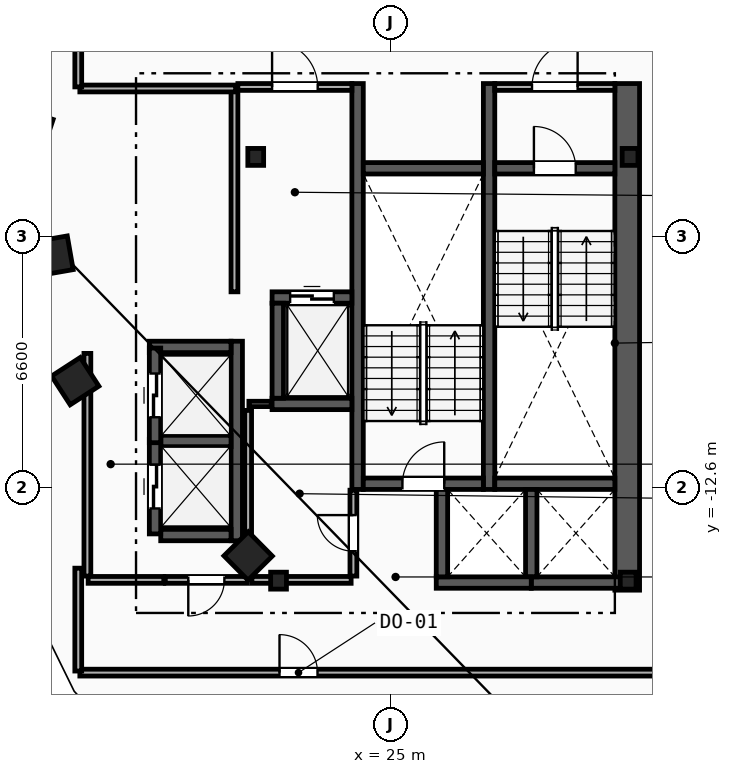
"""IFC4 building model, lengths in metres.
Left out: names, types, materials, properties, quantities, classifications, styles, units other than length and angle.
Written with IfcOpenShell. Run it as: python <this file> out.ifc"""

import sys

from ifc_helpers import new_model, si_unit, direction, frame, frame_2d, origin, origin_2d, place, context, subcontext, project, spatial, rectangle, i_section, extrude, element, fill, save


model = new_model("IFC4")
c1 = context("Model", 3, precision=1e-05, world=origin(), true_north=direction((0.0, 1.0)))
c2 = subcontext(c1, "Body", "Model", "MODEL_VIEW")
j1 = project(units=[si_unit("LENGTHUNIT", "METRE"), si_unit("PLANEANGLEUNIT", "RADIAN")], contexts=[c1])
p1 = place(None, origin())
s1 = spatial("IfcSite", under=j1, at=p1, CompositionType="ELEMENT")
p2 = place(p1, origin())
s2 = spatial("IfcBuilding", under=s1, at=p2, CompositionType="ELEMENT")
p3 = place(p2, frame((0.0, 0.0, 199.0)))
s3 = spatial("IfcBuildingStorey", under=s2, at=p3, CompositionType="ELEMENT", Elevation=199.0)
for number, where, z_axis, x_axis in (
    (1, (31.3, -3.9, 0.0), (0.0, 0.0, 1.0), (1.0, 0.0, 0.0)),
    (2, (21.45, -3.9, 0.0), (0.0, 0.0, 1.0), (1.0, 0.0, 0.0)),
    (3, (22.05, -15.05, 0.0), (0.0, 0.0, 1.0), (1.0, 0.0, 0.0)),
    (4, (31.25, -15.05, 0.0), (0.0, 0.0, 1.0), (1.0, 0.0, 0.0)),
):
    element("IfcColumn", number, at=place(p3, frame(where, z_axis=z_axis, x_axis=x_axis)), inside=s3, PredefinedType="COLUMN", context=c2, shape_type="SweptSolid", body=[
        extrude(i_section(OverallWidth=0.416, OverallDepth=0.446, WebThickness=0.039, FlangeThickness=0.063, FilletRadius=0.018, at=origin_2d()), origin(), (0.0, 0.0, 1.0), 3.6),
    ])
for number, where, z_axis, x_axis in (
    (5, (15.55, -3.2, 0.0), (0.0, 0.0, 1.0), (-0.315, -0.949, 0.0)),
    (6, (16.125, -6.5, 0.0), (0.0, 0.0, 1.0), (0.172, -0.985, 0.0)),
    (7, (16.7, -9.8, 0.0), (0.0, 0.0, 1.0), (0.544, -0.839, 0.0)),
    (8, (21.25, -14.4, 0.0), (0.0, 0.0, 1.0), (0.703, -0.711, 0.0)),
):
    element("IfcColumn", number, at=place(p3, frame(where, z_axis=z_axis, x_axis=x_axis)), inside=s3, PredefinedType="COLUMN", context=c2, shape_type="SweptSolid", body=[
        extrude(rectangle(XDim=0.9, YDim=0.9, at=origin_2d()), origin(), (0.0, 0.0, 1.0), 3.6),
    ])
p4 = place(p3, frame((31.225, -15.3, 0.0), z_axis=(0.0, 0.0, 1.0), x_axis=(0.0, 1.0, 0.0)))
e9 = element("IfcWall", 9, at=p4, inside=s3, PredefinedType="SHEAR", context=c2, shape_type="SweptSolid", body=[
    extrude(rectangle(XDim=13.33, YDim=0.65, at=frame_2d((6.665, 0.0))), origin(), (0.0, 0.0, 1.0), 3.34),
])
for number, where, z_axis, x_axis in (
    (10, (27.59, -12.65, 0.0), (0.0, 0.0, 1.0), (0.0, 1.0, 0.0)),
    (11, (24.13, -12.65, 0.0), (0.0, 0.0, 1.0), (0.0, 1.0, 0.0)),
):
    element("IfcWall", number, at=place(p3, frame(where, z_axis=z_axis, x_axis=x_axis)), inside=s3, PredefinedType="SHEAR", context=c2, shape_type="SweptSolid", body=[
        extrude(rectangle(XDim=10.68, YDim=0.3, at=frame_2d((5.34, 0.0))), origin(), (0.0, 0.0, 1.0), 3.34),
    ])
p5 = place(p3, frame((27.74, -4.2, 0.0), z_axis=(0.0, 0.0, 1.0), x_axis=(1.0, 0.0, 0.0)))
e12 = element("IfcWall", 12, at=p5, inside=s3, PredefinedType="SHEAR", context=c2, shape_type="SweptSolid", body=[
    extrude(rectangle(XDim=3.16, YDim=0.3, at=frame_2d((1.58, 0.0))), origin(), (0.0, 0.0, 1.0), 3.34),
])
p6 = place(p5, frame((1.03, 0.0, 0.0)))
e13 = element("IfcOpeningElement", 13, at=p6, cuts=e12, PredefinedType="OPENING", context=c2, shape_type="SweptSolid", body=[
    extrude(rectangle(XDim=1.1, YDim=2.15, at=frame_2d((0.55, 1.075))), frame((0.0, 0.16, 0.0), z_axis=(0.0, -1.0, 0.0), x_axis=(1.0, 0.0, 0.0)), (0.0, 0.0, 1.0), 0.32),
])
p7 = place(p3, frame((27.74, -12.5, 0.0), z_axis=(0.0, 0.0, 1.0), x_axis=(1.0, 0.0, 0.0)))
e14 = element("IfcWall", 14, at=p7, inside=s3, PredefinedType="SHEAR", context=c2, shape_type="SweptSolid", body=[
    extrude(rectangle(XDim=3.16, YDim=0.3, at=frame_2d((1.58, 0.0))), origin(), (0.0, 0.0, 1.0), 3.34),
])
p8 = place(p3, frame((24.28, -12.5, 0.0), z_axis=(0.0, 0.0, 1.0), x_axis=(1.0, 0.0, 0.0)))
e15 = element("IfcWall", 15, at=p8, inside=s3, PredefinedType="SHEAR", context=c2, shape_type="SweptSolid", body=[
    extrude(rectangle(XDim=3.16, YDim=0.3, at=frame_2d((1.58, 0.0))), origin(), (0.0, 0.0, 1.0), 3.34),
])
p9 = place(p8, frame((1.03, 0.0, 0.0)))
e16 = element("IfcOpeningElement", 16, at=p9, cuts=e15, PredefinedType="OPENING", context=c2, shape_type="SweptSolid", body=[
    extrude(rectangle(XDim=1.1, YDim=2.15, at=frame_2d((0.55, 1.075))), frame((0.0, 0.16, 0.0), z_axis=(0.0, -1.0, 0.0), x_axis=(1.0, 0.0, 0.0)), (0.0, 0.0, 1.0), 0.32),
])
p10 = place(p3, frame((24.28, -4.2, 0.0), z_axis=(0.0, 0.0, 1.0), x_axis=(1.0, 0.0, 0.0)))
e17 = element("IfcWall", 17, at=p10, inside=s3, PredefinedType="SHEAR", context=c2, shape_type="SweptSolid", body=[
    extrude(rectangle(XDim=3.16, YDim=0.3, at=frame_2d((1.58, 0.0))), origin(), (0.0, 0.0, 1.0), 3.34),
])
p11 = place(p3, frame((20.89, -7.45, 0.0), z_axis=(0.0, 0.0, 1.0), x_axis=(0.0, 1.0, 0.0)))
e18 = element("IfcWall", 18, at=p11, inside=s3, PredefinedType="PARTITIONING", context=c2, shape_type="SweptSolid", body=[
    extrude(rectangle(XDim=5.3, YDim=0.18, at=frame_2d((2.65, 0.0))), origin(), (0.0, 0.0, 1.0), 3.34),
])
p12 = place(p3, frame((20.98, -2.06, 0.0), z_axis=(0.0, 0.0, 1.0), x_axis=(1.0, 0.0, 0.0)))
e19 = element("IfcWall", 19, at=p12, inside=s3, PredefinedType="PARTITIONING", context=c2, shape_type="SweptSolid", body=[
    extrude(rectangle(XDim=3.0, YDim=0.18, at=frame_2d((1.5, 0.0))), origin(), (0.0, 0.0, 1.0), 3.34),
])
p13 = place(p12, frame((0.9, 0.0, 0.0)))
e20 = element("IfcOpeningElement", 20, at=p13, cuts=e19, PredefinedType="OPENING", context=c2, shape_type="SweptSolid", body=[
    extrude(rectangle(XDim=1.2, YDim=2.15, at=frame_2d((0.6, 1.075))), frame((0.0, 0.1, 0.0), z_axis=(0.0, -1.0, 0.0), x_axis=(1.0, 0.0, 0.0)), (0.0, 0.0, 1.0), 0.2),
])
p14 = place(p3, frame((27.74, -2.06, 0.0), z_axis=(0.0, 0.0, 1.0), x_axis=(1.0, 0.0, 0.0)))
e21 = element("IfcWall", 21, at=p14, inside=s3, PredefinedType="PARTITIONING", context=c2, shape_type="SweptSolid", body=[
    extrude(rectangle(XDim=3.16, YDim=0.18, at=frame_2d((1.58, 0.0))), origin(), (0.0, 0.0, 1.0), 3.34),
])
p15 = place(p14, frame((0.98, 0.0, 0.0)))
e22 = element("IfcOpeningElement", 22, at=p15, cuts=e21, PredefinedType="OPENING", context=c2, shape_type="SweptSolid", body=[
    extrude(rectangle(XDim=1.2, YDim=2.15, at=frame_2d((0.6, 1.075))), frame((0.0, 0.1, 0.0), z_axis=(0.0, -1.0, 0.0), x_axis=(1.0, 0.0, 0.0)), (0.0, 0.0, 1.0), 0.2),
])
p16 = place(p3, frame((21.88, -7.6, 0.0), z_axis=(0.0, 0.0, 1.0), x_axis=(1.0, 0.0, 0.0)))
e23 = element("IfcWall", 23, at=p16, inside=s3, PredefinedType="SHEAR", context=c2, shape_type="SweptSolid", body=[
    extrude(rectangle(XDim=2.1, YDim=0.3, at=frame_2d((1.05, 0.0))), origin(), (0.0, 0.0, 1.0), 3.34),
])
p17 = place(p16, frame((0.475, 0.0, 0.0)))
e24 = element("IfcOpeningElement", 24, at=p17, cuts=e23, PredefinedType="OPENING", context=c2, shape_type="SweptSolid", body=[
    extrude(rectangle(XDim=1.15, YDim=2.2, at=frame_2d((0.575, 1.1))), frame((0.0, 0.16, 0.0), z_axis=(0.0, -1.0, 0.0), x_axis=(1.0, 0.0, 0.0)), (0.0, 0.0, 1.0), 0.32),
])
p18 = place(p3, frame((21.88, -10.4, 0.0), z_axis=(0.0, 0.0, 1.0), x_axis=(1.0, 0.0, 0.0)))
e25 = element("IfcWall", 25, at=p18, inside=s3, PredefinedType="SHEAR", context=c2, shape_type="SweptSolid", body=[
    extrude(rectangle(XDim=2.1, YDim=0.3, at=frame_2d((1.05, 0.0))), origin(), (0.0, 0.0, 1.0), 3.34),
])
for number, where, z_axis, x_axis in (
    (26, (22.03, -10.25, 0.0), (0.0, 0.0, 1.0), (0.0, 1.0, 0.0)),
    (27, (28.7, -15.1, 0.0), (0.0, 0.0, 1.0), (1.0, 0.0, 0.0)),
):
    element("IfcWall", number, at=place(p3, frame(where, z_axis=z_axis, x_axis=x_axis)), inside=s3, PredefinedType="SHEAR", context=c2, shape_type="SweptSolid", body=[
        extrude(rectangle(XDim=2.5, YDim=0.3, at=frame_2d((1.25, 0.0))), origin(), (0.0, 0.0, 1.0), 3.34),
    ])
p19 = place(p3, frame((28.7, -14.95, 0.0), z_axis=(0.0, 0.0, 1.0), x_axis=(0.0, 1.0, 0.0)))
e28 = element("IfcWall", 28, at=p19, inside=s3, PredefinedType="SHEAR", context=c2, shape_type="SweptSolid", body=[
    extrude(rectangle(XDim=2.3, YDim=0.3, at=frame_2d((1.15, 0.0))), origin(), (0.0, 0.0, 1.0), 3.34),
])
p20 = place(p3, frame((26.2, -15.1, 0.0), z_axis=(0.0, 0.0, 1.0), x_axis=(1.0, 0.0, 0.0)))
e29 = element("IfcWall", 29, at=p20, inside=s3, PredefinedType="SHEAR", context=c2, shape_type="SweptSolid", body=[
    extrude(rectangle(XDim=2.5, YDim=0.3, at=frame_2d((1.25, 0.0))), origin(), (0.0, 0.0, 1.0), 3.34),
])
p21 = place(p3, frame((26.35, -14.95, 0.0), z_axis=(0.0, 0.0, 1.0), x_axis=(0.0, 1.0, 0.0)))
e30 = element("IfcWall", 30, at=p21, inside=s3, PredefinedType="SHEAR", context=c2, shape_type="SweptSolid", body=[
    extrude(rectangle(XDim=2.3, YDim=0.3, at=frame_2d((1.15, 0.0))), origin(), (0.0, 0.0, 1.0), 3.34),
])
p22 = place(p3, frame((20.95, -14.0, 0.0), z_axis=(0.0, 0.0, 1.0), x_axis=(0.0, 1.0, 0.0)))
e31 = element("IfcWall", 31, at=p22, inside=s3, PredefinedType="SHEAR", context=c2, shape_type="SweptSolid", body=[
    extrude(rectangle(XDim=5.25, YDim=0.3, at=frame_2d((2.625, 0.0))), origin(), (0.0, 0.0, 1.0), 3.34),
])
p23 = place(p3, frame((18.95, -13.85, 0.0), z_axis=(0.0, 0.0, 1.0), x_axis=(1.0, 0.0, 0.0)))
e32 = element("IfcWall", 32, at=p23, inside=s3, PredefinedType="SHEAR", context=c2, shape_type="SweptSolid", body=[
    extrude(rectangle(XDim=1.85, YDim=0.3, at=frame_2d((0.925, 0.0))), origin(), (0.0, 0.0, 1.0), 3.34),
])
p24 = place(p3, frame((18.65, -8.9, 0.0), z_axis=(0.0, 0.0, 1.0), x_axis=(1.0, 0.0, 0.0)))
e33 = element("IfcWall", 33, at=p24, inside=s3, PredefinedType="SHEAR", context=c2, shape_type="SweptSolid", body=[
    extrude(rectangle(XDim=2.15, YDim=0.3, at=frame_2d((1.075, 0.0))), origin(), (0.0, 0.0, 1.0), 3.34),
])
p25 = place(p3, frame((18.95, -11.375, 0.0), z_axis=(0.0, 0.0, 1.0), x_axis=(1.0, 0.0, 0.0)))
e34 = element("IfcWall", 34, at=p25, inside=s3, PredefinedType="SHEAR", context=c2, shape_type="SweptSolid", body=[
    extrude(rectangle(XDim=1.85, YDim=0.3, at=frame_2d((0.925, 0.0))), origin(), (0.0, 0.0, 1.0), 3.34),
])
p26 = place(p3, frame((18.8, -13.82, 0.0), z_axis=(0.0, 0.0, 1.0), x_axis=(0.0, 1.0, 0.0)))
e35 = element("IfcWall", 35, at=p26, inside=s3, PredefinedType="SHEAR", context=c2, shape_type="SweptSolid", body=[
    extrude(rectangle(XDim=2.49, YDim=0.3, at=frame_2d((1.245, 0.0))), origin(), (0.0, 0.0, 1.0), 3.34),
])
p27 = place(p26, frame((0.67, 0.0, 0.0)))
e36 = element("IfcOpeningElement", 36, at=p27, cuts=e35, PredefinedType="OPENING", context=c2, shape_type="SweptSolid", body=[
    extrude(rectangle(XDim=1.15, YDim=2.2, at=frame_2d((0.575, 1.1))), frame((0.0, 0.16, 0.0), z_axis=(0.0, -1.0, 0.0), x_axis=(1.0, 0.0, 0.0)), (0.0, 0.0, 1.0), 0.32),
])
p28 = place(p3, frame((18.8, -11.42, 0.0), z_axis=(0.0, 0.0, 1.0), x_axis=(0.0, 1.0, 0.0)))
e37 = element("IfcWall", 37, at=p28, inside=s3, PredefinedType="SHEAR", context=c2, shape_type="SweptSolid", body=[
    extrude(rectangle(XDim=2.49, YDim=0.3, at=frame_2d((1.245, 0.0))), origin(), (0.0, 0.0, 1.0), 3.34),
])
p29 = place(p28, frame((0.67, 0.0, 0.0)))
e38 = element("IfcOpeningElement", 38, at=p29, cuts=e37, PredefinedType="OPENING", context=c2, shape_type="SweptSolid", body=[
    extrude(rectangle(XDim=1.15, YDim=2.2, at=frame_2d((0.575, 1.1))), frame((0.0, 0.16, 0.0), z_axis=(0.0, -1.0, 0.0), x_axis=(1.0, 0.0, 0.0)), (0.0, 0.0, 1.0), 0.32),
])
p30 = place(p3, frame((17.02, -14.93, 0.0), z_axis=(0.0, 0.0, 1.0), x_axis=(0.0, 1.0, 0.0)))
e39 = element("IfcWall", 39, at=p30, inside=s3, PredefinedType="PARTITIONING", context=c2, shape_type="SweptSolid", body=[
    extrude(rectangle(XDim=5.86, YDim=0.18, at=frame_2d((2.93, 0.0))), origin(), (0.0, 0.0, 1.0), 3.34),
])
p31 = place(p3, frame((17.04, -15.03, 0.0), z_axis=(0.0, 0.0, 1.0), x_axis=(1.0, 0.0, 0.0)))
e40 = element("IfcWall", 40, at=p31, inside=s3, PredefinedType="PARTITIONING", context=c2, shape_type="SweptSolid", body=[
    extrude(rectangle(XDim=1.99, YDim=0.18, at=frame_2d((0.995, 0.0))), origin(), (0.0, 0.0, 1.0), 3.34),
])
p32 = place(p3, frame((21.23, -15.03, 0.0), z_axis=(0.0, 0.0, 1.0), x_axis=(-1.0, 0.0, 0.0)))
e41 = element("IfcWall", 41, at=p32, inside=s3, PredefinedType="PARTITIONING", context=c2, shape_type="SweptSolid", body=[
    extrude(rectangle(XDim=2.16, YDim=0.18, at=frame_2d((1.08, 0.0))), origin(), (0.0, 0.0, 1.0), 3.34),
])
p33 = place(p32, frame((0.605, 0.0, 0.0)))
e42 = element("IfcOpeningElement", 42, at=p33, cuts=e41, PredefinedType="OPENING", context=c2, shape_type="SweptSolid", body=[
    extrude(rectangle(XDim=0.95, YDim=2.1, at=frame_2d((0.475, 1.05))), frame((0.0, 0.1, 0.0), z_axis=(0.0, -1.0, 0.0), x_axis=(1.0, 0.0, 0.0)), (0.0, 0.0, 1.0), 0.2),
])
p34 = place(p3, frame((21.27, -10.4, 0.0), z_axis=(0.0, 0.0, 1.0), x_axis=(1.0, 0.0, 0.0)))
e43 = element("IfcWall", 43, at=p34, inside=s3, PredefinedType="PARTITIONING", context=c2, shape_type="SweptSolid", body=[
    extrude(rectangle(XDim=0.59, YDim=0.14, at=frame_2d((0.295, 0.0))), origin(), (0.0, 0.0, 1.0), 3.34),
])
p35 = place(p3, frame((21.25, -14.93, 0.0), z_axis=(0.0, 0.0, 1.0), x_axis=(0.0, 1.0, 0.0)))
e44 = element("IfcWall", 44, at=p35, inside=s3, PredefinedType="PARTITIONING", context=c2, shape_type="SweptSolid", body=[
    extrude(rectangle(XDim=4.36, YDim=0.18, at=frame_2d((2.18, 0.0))), origin(), (0.0, 0.0, 1.0), 3.34),
])
p36 = place(p3, frame((21.35, -15.03, 0.0), z_axis=(0.0, 0.0, 1.0), x_axis=(1.0, 0.0, 0.0)))
e45 = element("IfcWall", 45, at=p36, inside=s3, PredefinedType="PARTITIONING", context=c2, shape_type="SweptSolid", body=[
    extrude(rectangle(XDim=2.61, YDim=0.18, at=frame_2d((1.305, 0.0))), origin(), (0.0, 0.0, 1.0), 2.413),
])
p37 = place(p3, frame((24.02, -14.93, 0.0), z_axis=(0.0, 0.0, 1.0), x_axis=(0.0, 1.0, 0.0)))
e46 = element("IfcWall", 46, at=p37, inside=s3, PredefinedType="PARTITIONING", context=c2, shape_type="SweptSolid", body=[
    extrude(rectangle(XDim=2.26, YDim=0.18, at=frame_2d((1.13, 0.0))), origin(), (0.0, 0.0, 1.0), 3.34),
])
p38 = place(p37, frame((0.655, 0.0, 0.0)))
e47 = element("IfcOpeningElement", 47, at=p38, cuts=e46, PredefinedType="OPENING", context=c2, shape_type="SweptSolid", body=[
    extrude(rectangle(XDim=0.95, YDim=2.1, at=frame_2d((0.475, 1.05))), frame((0.0, 0.1, 0.0), z_axis=(0.0, -1.0, 0.0), x_axis=(1.0, 0.0, 0.0)), (0.0, 0.0, 1.0), 0.2),
])
p39 = place(p3, frame((16.822, -17.47, 0.0), z_axis=(0.0, 0.0, 1.0), x_axis=(1.0, 0.0, 0.0)))
e48 = element("IfcWall", 48, at=p39, inside=s3, PredefinedType="PARTITIONING", context=c2, shape_type="SweptSolid", body=[
    extrude(rectangle(XDim=15.908, YDim=0.18, at=frame_2d((7.954, 0.0))), origin(), (0.0, 0.0, 1.0), 3.34),
])
p40 = place(p39, frame((5.254, 0.0, 0.0)))
e49 = element("IfcOpeningElement", 49, at=p40, cuts=e48, PredefinedType="OPENING", context=c2, shape_type="SweptSolid", body=[
    extrude(rectangle(XDim=1.0, YDim=2.15, at=frame_2d((0.5, 1.075))), frame((0.0, 0.1, 0.0), z_axis=(0.0, -1.0, 0.0), x_axis=(1.0, 0.0, 0.0)), (0.0, 0.0, 1.0), 0.2),
])
p41 = place(p3, frame((16.822, -2.1, 0.0), z_axis=(0.0, 0.0, 1.0), x_axis=(1.0, 0.0, 0.0)))
e50 = element("IfcWall", 50, at=p41, inside=s3, PredefinedType="PARTITIONING", context=c2, shape_type="SweptSolid", body=[
    extrude(rectangle(XDim=4.098, YDim=0.18, at=frame_2d((2.049, 0.0))), origin(), (0.0, 0.0, 1.0), 3.34),
])
p42 = place(p3, frame((16.78, -14.721, 0.0), z_axis=(0.0, 0.0, 1.0), x_axis=(0.0, -1.0, 0.0)))
e51 = element("IfcWall", 51, at=p42, inside=s3, PredefinedType="PARTITIONING", context=c2, shape_type="SweptSolid", body=[
    extrude(rectangle(XDim=2.707, YDim=0.18, at=frame_2d((1.354, 0.0))), origin(), (0.0, 0.0, 1.0), 3.34),
])
p43 = place(p3, frame((16.78, 0.329, 0.0), z_axis=(0.0, 0.0, 1.0), x_axis=(0.0, -1.0, 0.0)))
e52 = element("IfcWall", 52, at=p43, inside=s3, PredefinedType="PARTITIONING", context=c2, shape_type="SweptSolid", body=[
    extrude(rectangle(XDim=2.387, YDim=0.18, at=frame_2d((1.194, 0.0))), origin(), (0.0, 0.0, 1.0), 3.34),
])
p44 = place(p6, origin())
e53 = element("IfcDoor", 53, at=p44, inside=s3, OperationType="SINGLE_SWING_LEFT", PredefinedType="DOOR", context=c2, shape_type="SweptSolid", body=[
    extrude(rectangle(XDim=1.1, YDim=2.15, at=frame_2d((0.55, 1.075))), frame((0.0, 0.025, 0.0), z_axis=(0.0, -1.0, 0.0), x_axis=(1.0, 0.0, 0.0)), (0.0, 0.0, 1.0), 0.05),
])
fill(e13, e53)
p45 = place(p9, origin())
e54 = element("IfcDoor", 54, at=p45, inside=s3, OperationType="SINGLE_SWING_RIGHT", PredefinedType="DOOR", context=c2, shape_type="SweptSolid", body=[
    extrude(rectangle(XDim=1.1, YDim=2.15, at=frame_2d((0.55, 1.075))), frame((0.0, 0.025, 0.0), z_axis=(0.0, -1.0, 0.0), x_axis=(1.0, 0.0, 0.0)), (0.0, 0.0, 1.0), 0.05),
])
fill(e16, e54)
p46 = place(p13, origin())
e55 = element("IfcDoor", 55, at=p46, inside=s3, OperationType="SINGLE_SWING_LEFT", PredefinedType="DOOR", context=c2, shape_type="SweptSolid", body=[
    extrude(rectangle(XDim=1.2, YDim=2.15, at=frame_2d((0.6, 1.075))), frame((0.0, 0.025, 0.0), z_axis=(0.0, -1.0, 0.0), x_axis=(1.0, 0.0, 0.0)), (0.0, 0.0, 1.0), 0.05),
])
fill(e20, e55)
p47 = place(p15, origin())
e56 = element("IfcDoor", 56, at=p47, inside=s3, OperationType="SINGLE_SWING_RIGHT", PredefinedType="DOOR", context=c2, shape_type="SweptSolid", body=[
    extrude(rectangle(XDim=1.2, YDim=2.15, at=frame_2d((0.6, 1.075))), frame((0.0, 0.025, 0.0), z_axis=(0.0, -1.0, 0.0), x_axis=(1.0, 0.0, 0.0)), (0.0, 0.0, 1.0), 0.05),
])
fill(e22, e56)
p48 = place(p17, origin())
e57 = element("IfcDoor", 57, at=p48, inside=s3, OperationType="SLIDING_TO_LEFT", PredefinedType="TRAPDOOR", context=c2, shape_type="SweptSolid", body=[
    extrude(rectangle(XDim=1.15, YDim=2.2, at=frame_2d((0.575, 1.1))), frame((0.0, 0.025, 0.0), z_axis=(0.0, -1.0, 0.0), x_axis=(1.0, 0.0, 0.0)), (0.0, 0.0, 1.0), 0.05),
])
fill(e24, e57)
p49 = place(p27, origin())
e58 = element("IfcDoor", 58, at=p49, inside=s3, OperationType="SLIDING_TO_LEFT", PredefinedType="TRAPDOOR", context=c2, shape_type="SweptSolid", body=[
    extrude(rectangle(XDim=1.15, YDim=2.2, at=frame_2d((0.575, 1.1))), frame((0.0, 0.025, 0.0), z_axis=(0.0, -1.0, 0.0), x_axis=(1.0, 0.0, 0.0)), (0.0, 0.0, 1.0), 0.05),
])
fill(e36, e58)
p50 = place(p29, origin())
e59 = element("IfcDoor", 59, at=p50, inside=s3, OperationType="SLIDING_TO_LEFT", PredefinedType="TRAPDOOR", context=c2, shape_type="SweptSolid", body=[
    extrude(rectangle(XDim=1.15, YDim=2.2, at=frame_2d((0.575, 1.1))), frame((0.0, 0.025, 0.0), z_axis=(0.0, -1.0, 0.0), x_axis=(1.0, 0.0, 0.0)), (0.0, 0.0, 1.0), 0.05),
])
fill(e38, e59)
p51 = place(p40, origin())
e60 = element("IfcDoor", 60, at=p51, inside=s3, OperationType="SINGLE_SWING_LEFT", PredefinedType="DOOR", context=c2, shape_type="SweptSolid", body=[
    extrude(rectangle(XDim=1.0, YDim=2.15, at=frame_2d((0.5, 1.075))), frame((0.0, 0.025, 0.0), z_axis=(0.0, -1.0, 0.0), x_axis=(1.0, 0.0, 0.0)), (0.0, 0.0, 1.0), 0.05),
])
fill(e49, e60)
p52 = place(p38, origin())
e61 = element("IfcDoor", 61, at=p52, inside=s3, OperationType="SINGLE_SWING_RIGHT", PredefinedType="DOOR", context=c2, shape_type="SweptSolid", body=[
    extrude(rectangle(XDim=0.95, YDim=2.1, at=frame_2d((0.475, 1.05))), frame((0.0, 0.025, 0.0), z_axis=(0.0, -1.0, 0.0), x_axis=(1.0, 0.0, 0.0)), (0.0, 0.0, 1.0), 0.05),
])
fill(e47, e61)
p53 = place(p33, origin())
e62 = element("IfcDoor", 62, at=p53, inside=s3, OperationType="SINGLE_SWING_RIGHT", PredefinedType="DOOR", context=c2, shape_type="SweptSolid", body=[
    extrude(rectangle(XDim=0.95, YDim=2.1, at=frame_2d((0.475, 1.05))), frame((0.0, 0.025, 0.0), z_axis=(0.0, -1.0, 0.0), x_axis=(1.0, 0.0, 0.0)), (0.0, 0.0, 1.0), 0.05),
])
fill(e42, e62)
save(model, sys.argv[1])
